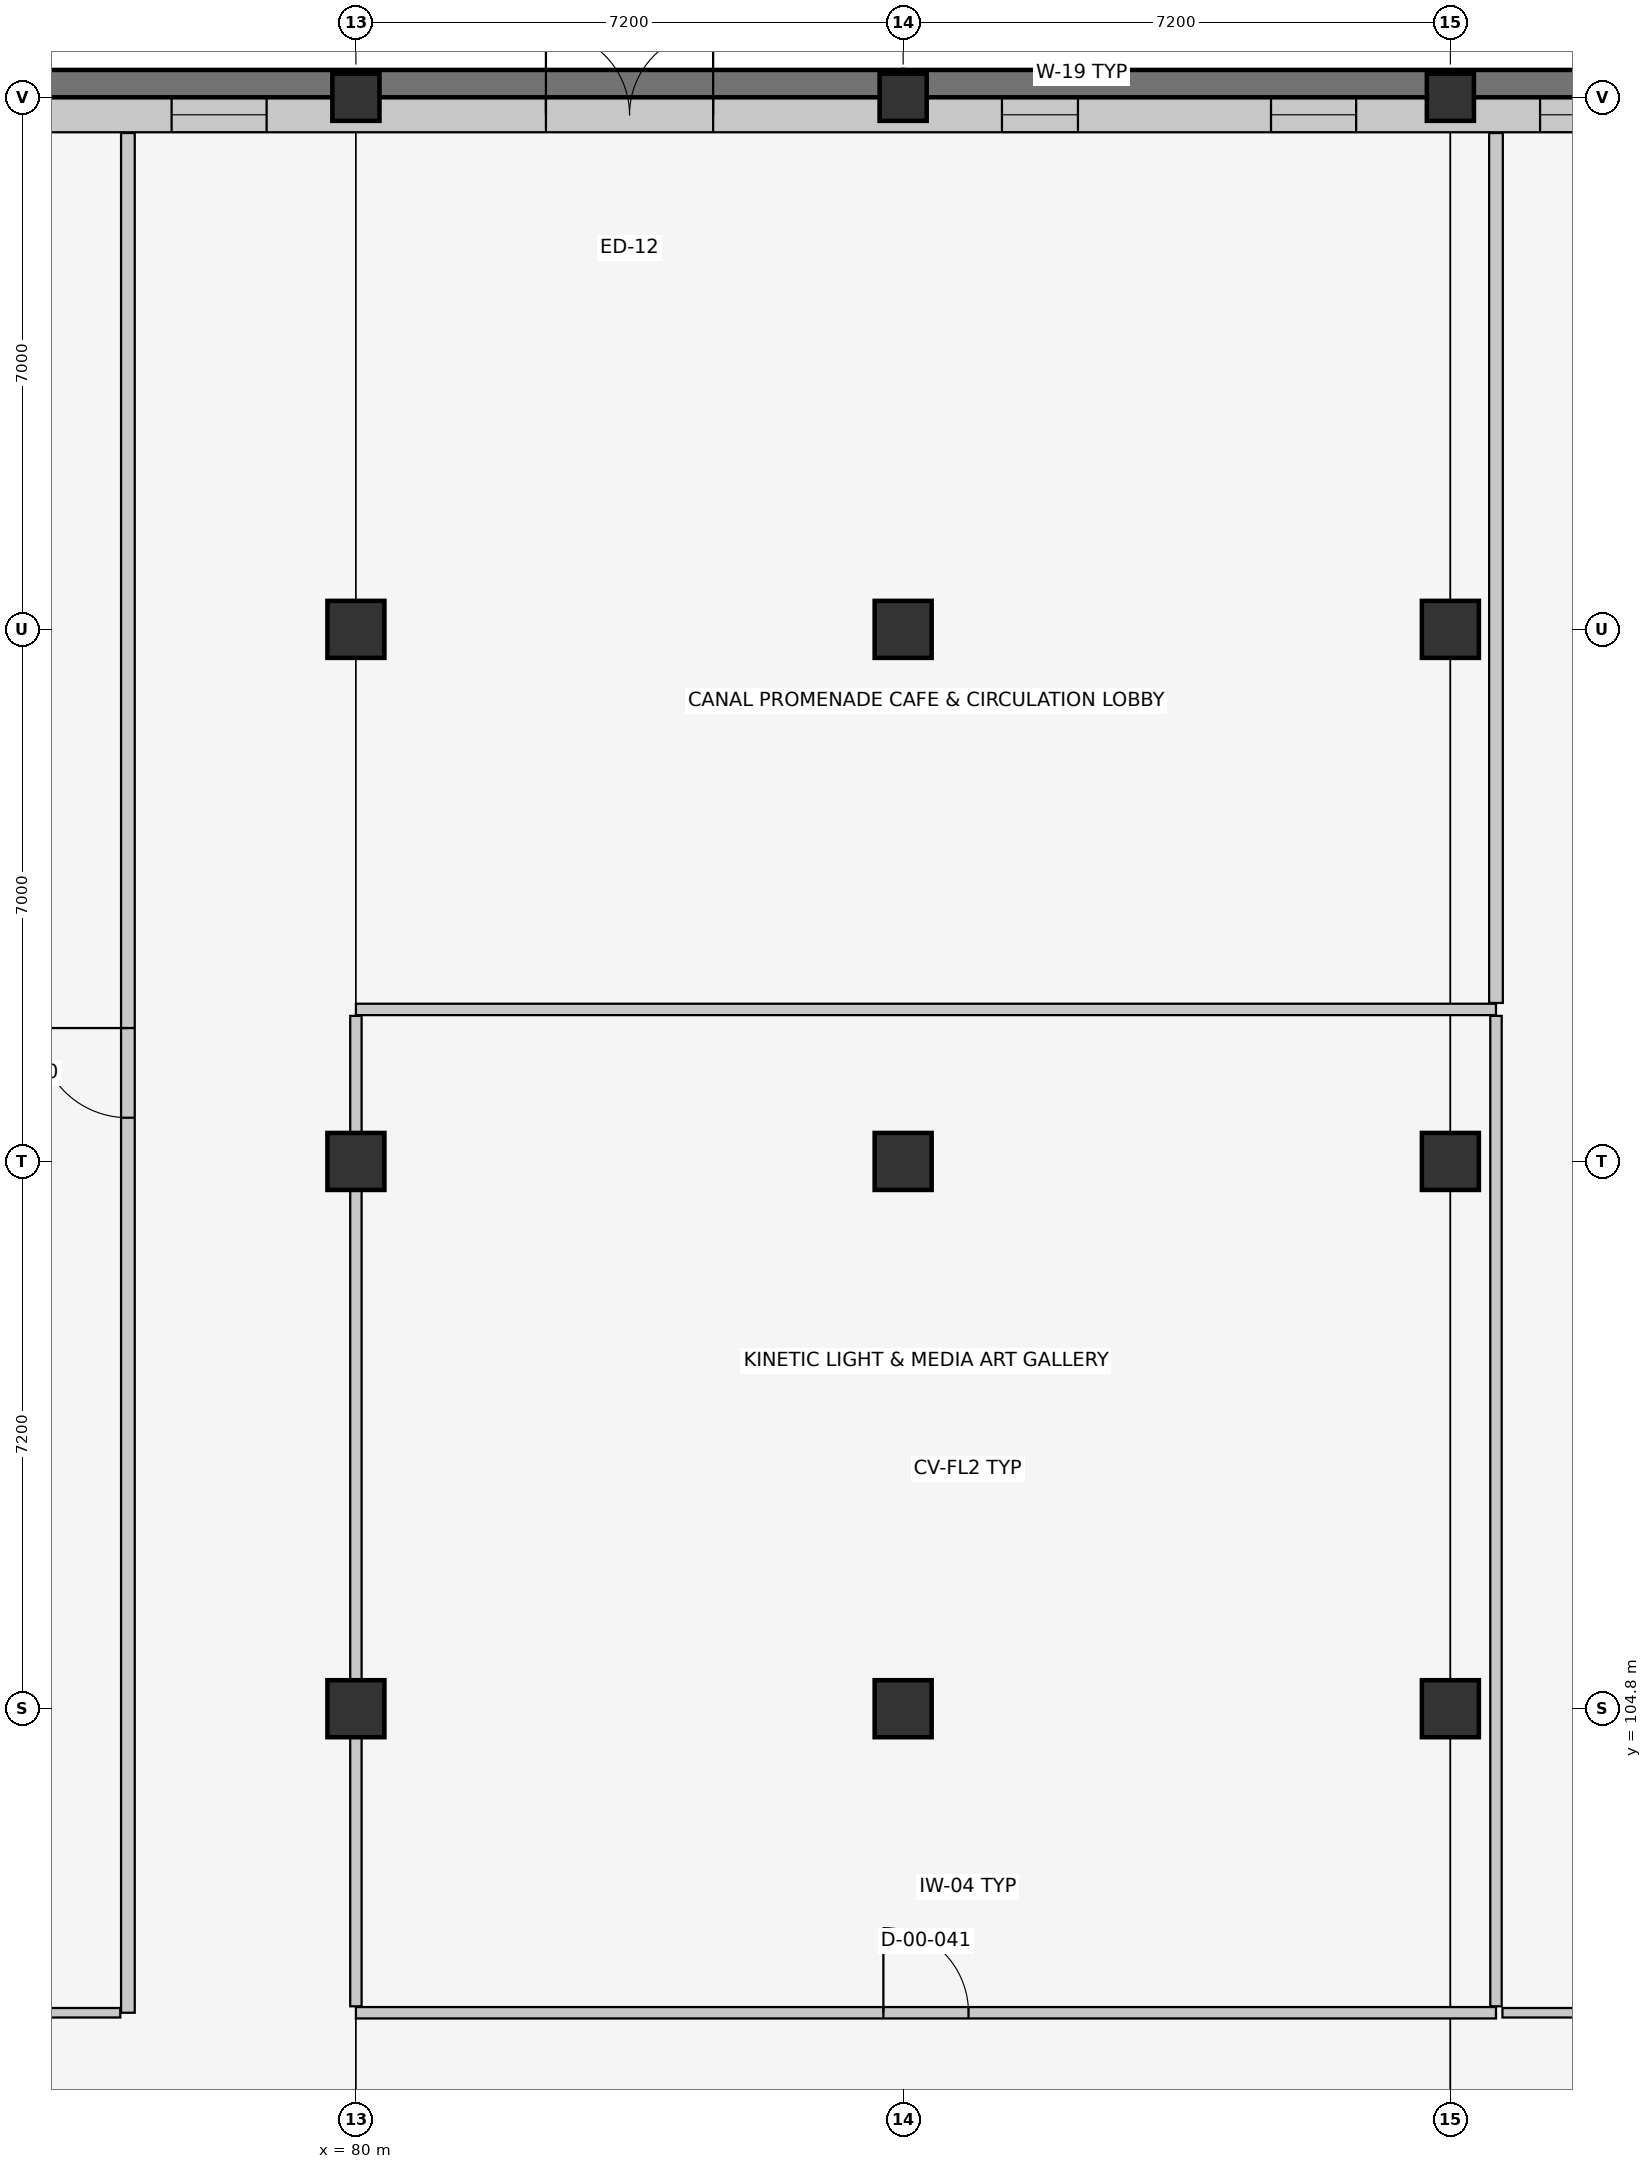
"""IFC4 building model, lengths in metres.
Left out: names, types, materials, properties, quantities, classifications, styles, units other than length and angle.
Written with IfcOpenShell. Run it as: python <this file> out.ifc"""

import sys

from ifc_helpers import new_model, si_unit, direction, frame, frame_2d, origin, origin_2d, place, context, subcontext, project, spatial, rectangle, circle, extrude, element, fill, save


model = new_model("IFC4")
c1 = context("Model", 3, precision=1e-05, world=origin(), true_north=direction((0.0, 1.0)))
c2 = subcontext(c1, "Body", "Model", "MODEL_VIEW")
j1 = project(units=[si_unit("LENGTHUNIT", "METRE"), si_unit("PLANEANGLEUNIT", "RADIAN")], contexts=[c1])
p1 = place(None, origin())
s1 = spatial("IfcSite", under=j1, at=p1, CompositionType="ELEMENT")
p2 = place(p1, origin())
s2 = spatial("IfcBuilding", under=s1, at=p2, CompositionType="ELEMENT")
p3 = place(p2, origin())
s3 = spatial("IfcBuildingStorey", under=s2, at=p3, CompositionType="ELEMENT", Elevation=0.0)
for number, where, z_axis, x_axis in (
    (1, (80.0, 104.8, 0.0), (0.0, 0.0, 1.0), (1.0, 0.0, 0.0)),
    (2, (80.0, 112.0, 0.0), (0.0, 0.0, 1.0), (1.0, 0.0, 0.0)),
    (3, (80.0, 119.0, 0.0), (0.0, 0.0, 1.0), (1.0, 0.0, 0.0)),
):
    element("IfcColumn", number, at=place(p3, frame(where, z_axis=z_axis, x_axis=x_axis)), inside=s3, PredefinedType="COLUMN", context=c2, shape_type="SweptSolid", body=[
        extrude(circle(Radius=0.375, at=origin_2d()), origin(), (0.0, 0.0, 1.0), 5.4),
    ])
p4 = place(p3, frame((80.0, 126.0, 0.0), z_axis=(0.0, 0.0, 1.0), x_axis=(1.0, 0.0, 0.0)))
e4 = element("IfcColumn", 4, at=p4, inside=s3, PredefinedType="COLUMN", context=c2, shape_type="SweptSolid", body=[
    extrude(rectangle(XDim=0.62, YDim=0.62, at=origin_2d()), origin(), (0.0, 0.0, 1.0), 5.4),
])
for number, where, z_axis, x_axis in (
    (5, (87.2, 104.8, 0.0), (0.0, 0.0, 1.0), (1.0, 0.0, 0.0)),
    (6, (87.2, 112.0, 0.0), (0.0, 0.0, 1.0), (1.0, 0.0, 0.0)),
    (7, (87.2, 119.0, 0.0), (0.0, 0.0, 1.0), (1.0, 0.0, 0.0)),
):
    element("IfcColumn", number, at=place(p3, frame(where, z_axis=z_axis, x_axis=x_axis)), inside=s3, PredefinedType="COLUMN", context=c2, shape_type="SweptSolid", body=[
        extrude(circle(Radius=0.375, at=origin_2d()), origin(), (0.0, 0.0, 1.0), 5.4),
    ])
p5 = place(p3, frame((87.2, 126.0, 0.0), z_axis=(0.0, 0.0, 1.0), x_axis=(1.0, 0.0, 0.0)))
e8 = element("IfcColumn", 8, at=p5, inside=s3, PredefinedType="COLUMN", context=c2, shape_type="SweptSolid", body=[
    extrude(rectangle(XDim=0.62, YDim=0.62, at=origin_2d()), origin(), (0.0, 0.0, 1.0), 5.4),
])
for number, where, z_axis, x_axis in (
    (9, (94.4, 104.8, 0.0), (0.0, 0.0, 1.0), (1.0, 0.0, 0.0)),
    (10, (94.4, 112.0, 0.0), (0.0, 0.0, 1.0), (1.0, 0.0, 0.0)),
    (11, (94.4, 119.0, 0.0), (0.0, 0.0, 1.0), (1.0, 0.0, 0.0)),
):
    element("IfcColumn", number, at=place(p3, frame(where, z_axis=z_axis, x_axis=x_axis)), inside=s3, PredefinedType="COLUMN", context=c2, shape_type="SweptSolid", body=[
        extrude(circle(Radius=0.375, at=origin_2d()), origin(), (0.0, 0.0, 1.0), 5.4),
    ])
p6 = place(p3, frame((94.4, 126.0, 0.0), z_axis=(0.0, 0.0, 1.0), x_axis=(1.0, 0.0, 0.0)))
e12 = element("IfcColumn", 12, at=p6, inside=s3, PredefinedType="COLUMN", context=c2, shape_type="SweptSolid", body=[
    extrude(rectangle(XDim=0.62, YDim=0.62, at=origin_2d()), origin(), (0.0, 0.0, 1.0), 5.4),
])
p7 = place(p3, frame((65.6, 125.77, 0.0), z_axis=(0.0, 0.0, 1.0), x_axis=(1.0, 0.0, 0.0)))
e13 = element("IfcWall", 13, at=p7, inside=s3, PredefinedType="SOLIDWALL", context=c2, shape_type="SweptSolid", body=[
    extrude(rectangle(XDim=43.2, YDim=0.46, at=frame_2d((21.6, 0.0))), origin(), (0.0, 0.0, 1.0), 4.455),
])
p8 = place(p7, frame((16.9, 0.0, 0.0)))
e14 = element("IfcOpeningElement", 14, at=p8, cuts=e13, PredefinedType="OPENING", context=c2, shape_type="SweptSolid", body=[
    extrude(rectangle(XDim=2.2, YDim=2.4, at=frame_2d((1.1, 1.2))), frame((0.0, 0.242, 0.0), z_axis=(0.0, -1.0, 0.0), x_axis=(1.0, 0.0, 0.0)), (0.0, 0.0, 1.0), 0.484),
])
p9 = place(p7, frame((1.35, 0.0, 0.9)))
e15 = element("IfcOpeningElement", 15, at=p9, cuts=e13, PredefinedType="OPENING", context=c2, shape_type="SweptSolid", body=[
    extrude(rectangle(XDim=0.9, YDim=1.6, at=frame_2d((0.45, 0.8))), frame((0.0, 0.242, 0.0), z_axis=(0.0, -1.0, 0.0), x_axis=(1.0, 0.0, 0.0)), (0.0, 0.0, 1.0), 0.484),
])
p10 = place(p7, frame((4.875, 0.0, 0.9)))
e16 = element("IfcOpeningElement", 16, at=p10, cuts=e13, PredefinedType="OPENING", context=c2, shape_type="SweptSolid", body=[
    extrude(rectangle(XDim=1.05, YDim=1.6, at=frame_2d((0.525, 0.8))), frame((0.0, 0.242, 0.0), z_axis=(0.0, -1.0, 0.0), x_axis=(1.0, 0.0, 0.0)), (0.0, 0.0, 1.0), 0.484),
])
p11 = place(p7, frame((8.425, 0.0, 0.9)))
e17 = element("IfcOpeningElement", 17, at=p11, cuts=e13, PredefinedType="OPENING", context=c2, shape_type="SweptSolid", body=[
    extrude(rectangle(XDim=1.15, YDim=1.6, at=frame_2d((0.575, 0.8))), frame((0.0, 0.242, 0.0), z_axis=(0.0, -1.0, 0.0), x_axis=(1.0, 0.0, 0.0)), (0.0, 0.0, 1.0), 0.484),
])
p12 = place(p7, frame((11.975, 0.0, 0.9)))
e18 = element("IfcOpeningElement", 18, at=p12, cuts=e13, PredefinedType="OPENING", context=c2, shape_type="SweptSolid", body=[
    extrude(rectangle(XDim=1.25, YDim=1.6, at=frame_2d((0.625, 0.8))), frame((0.0, 0.242, 0.0), z_axis=(0.0, -1.0, 0.0), x_axis=(1.0, 0.0, 0.0)), (0.0, 0.0, 1.0), 0.484),
])
p13 = place(p7, frame((22.9, 0.0, 0.9)))
e19 = element("IfcOpeningElement", 19, at=p13, cuts=e13, PredefinedType="OPENING", context=c2, shape_type="SweptSolid", body=[
    extrude(rectangle(XDim=1.0, YDim=1.75, at=frame_2d((0.5, 0.875))), frame((0.0, 0.242, 0.0), z_axis=(0.0, -1.0, 0.0), x_axis=(1.0, 0.0, 0.0)), (0.0, 0.0, 1.0), 0.484),
])
p14 = place(p7, frame((26.44, 0.0, 0.9)))
e20 = element("IfcOpeningElement", 20, at=p14, cuts=e13, PredefinedType="OPENING", context=c2, shape_type="SweptSolid", body=[
    extrude(rectangle(XDim=1.12, YDim=1.75, at=frame_2d((0.56, 0.875))), frame((0.0, 0.242, 0.0), z_axis=(0.0, -1.0, 0.0), x_axis=(1.0, 0.0, 0.0)), (0.0, 0.0, 1.0), 0.484),
])
p15 = place(p7, frame((29.98, 0.0, 0.9)))
e21 = element("IfcOpeningElement", 21, at=p15, cuts=e13, PredefinedType="OPENING", context=c2, shape_type="SweptSolid", body=[
    extrude(rectangle(XDim=1.24, YDim=1.75, at=frame_2d((0.62, 0.875))), frame((0.0, 0.242, 0.0), z_axis=(0.0, -1.0, 0.0), x_axis=(1.0, 0.0, 0.0)), (0.0, 0.0, 1.0), 0.484),
])
p16 = place(p7, frame((33.53, 0.0, 0.9)))
e22 = element("IfcOpeningElement", 22, at=p16, cuts=e13, PredefinedType="OPENING", context=c2, shape_type="SweptSolid", body=[
    extrude(rectangle(XDim=1.34, YDim=1.75, at=frame_2d((0.67, 0.875))), frame((0.0, 0.242, 0.0), z_axis=(0.0, -1.0, 0.0), x_axis=(1.0, 0.0, 0.0)), (0.0, 0.0, 1.0), 0.484),
])
p17 = place(p7, frame((37.08, 0.0, 0.9)))
e23 = element("IfcOpeningElement", 23, at=p17, cuts=e13, PredefinedType="OPENING", context=c2, shape_type="SweptSolid", body=[
    extrude(rectangle(XDim=1.44, YDim=1.75, at=frame_2d((0.72, 0.875))), frame((0.0, 0.242, 0.0), z_axis=(0.0, -1.0, 0.0), x_axis=(1.0, 0.0, 0.0)), (0.0, 0.0, 1.0), 0.484),
])
p18 = place(p7, frame((40.65, 0.0, 0.9)))
e24 = element("IfcOpeningElement", 24, at=p18, cuts=e13, PredefinedType="OPENING", context=c2, shape_type="SweptSolid", body=[
    extrude(rectangle(XDim=1.5, YDim=1.75, at=frame_2d((0.75, 0.875))), frame((0.0, 0.242, 0.0), z_axis=(0.0, -1.0, 0.0), x_axis=(1.0, 0.0, 0.0)), (0.0, 0.0, 1.0), 0.484),
])
p19 = place(p3, frame((65.8, 126.18, -0.8), z_axis=(0.0, 0.0, 1.0), x_axis=(1.0, 0.0, 0.0)))
e25 = element("IfcWall", 25, at=p19, inside=s3, PredefinedType="USERDEFINED", context=c2, shape_type="SweptSolid", body=[
    extrude(rectangle(XDim=21.4, YDim=0.36, at=frame_2d((10.7, 0.0))), origin(), (0.0, 0.0, 1.0), 1.35),
])
p20 = place(p3, frame((87.2, 126.18, -0.8), z_axis=(0.0, 0.0, 1.0), x_axis=(1.0, 0.0, 0.0)))
e26 = element("IfcWall", 26, at=p20, inside=s3, PredefinedType="USERDEFINED", context=c2, shape_type="SweptSolid", body=[
    extrude(rectangle(XDim=21.4, YDim=0.36, at=frame_2d((10.7, 0.0))), origin(), (0.0, 0.0, 1.0), 1.35),
])
p21 = place(p3, frame((77.0, 100.8, 0.0), z_axis=(0.0, 0.0, 1.0), x_axis=(0.0, 1.0, 0.0)))
e27 = element("IfcWall", 27, at=p21, inside=s3, PredefinedType="PARTITIONING", context=c2, shape_type="SweptSolid", body=[
    extrude(rectangle(XDim=24.73, YDim=0.18, at=frame_2d((12.365, 0.0))), origin(), (0.0, 0.0, 1.0), 5.12),
])
p22 = place(p21, frame((11.775, 0.0, 0.0)))
e28 = element("IfcOpeningElement", 28, at=p22, cuts=e27, PredefinedType="OPENING", context=c2, shape_type="SweptSolid", body=[
    extrude(rectangle(XDim=1.18, YDim=2.2, at=frame_2d((0.59, 1.1))), frame((0.0, 0.102, 0.0), z_axis=(0.0, -1.0, 0.0), x_axis=(1.0, 0.0, 0.0)), (0.0, 0.0, 1.0), 0.204),
])
p23 = place(p3, frame((66.07, 100.8, 0.0), z_axis=(0.0, 0.0, 1.0), x_axis=(1.0, 0.0, 0.0)))
e29 = element("IfcWall", 29, at=p23, inside=s3, PredefinedType="PARTITIONING", context=c2, shape_type="SweptSolid", body=[
    extrude(rectangle(XDim=10.83, YDim=0.125, at=frame_2d((5.415, 0.0))), origin(), (0.0, 0.0, 1.0), 5.12),
])
p24 = place(p3, frame((80.0, 100.8, 0.0), z_axis=(0.0, 0.0, 1.0), x_axis=(1.0, 0.0, 0.0)))
e30 = element("IfcWall", 30, at=p24, inside=s3, PredefinedType="PARTITIONING", context=c2, shape_type="SweptSolid", body=[
    extrude(rectangle(XDim=15.0, YDim=0.15, at=frame_2d((7.5, 0.0))), origin(), (0.0, 0.0, 1.0), 5.12),
])
p25 = place(p24, frame((6.94, 0.0, 0.0)))
e31 = element("IfcOpeningElement", 31, at=p25, cuts=e30, PredefinedType="OPENING", context=c2, shape_type="SweptSolid", body=[
    extrude(rectangle(XDim=1.12, YDim=2.15, at=frame_2d((0.56, 1.075))), frame((0.0, 0.087, 0.0), z_axis=(0.0, -1.0, 0.0), x_axis=(1.0, 0.0, 0.0)), (0.0, 0.0, 1.0), 0.174),
])
p26 = place(p3, frame((80.0, 114.0, 0.0), z_axis=(0.0, 0.0, 1.0), x_axis=(1.0, 0.0, 0.0)))
e32 = element("IfcWall", 32, at=p26, inside=s3, PredefinedType="PARTITIONING", context=c2, shape_type="SweptSolid", body=[
    extrude(rectangle(XDim=15.0, YDim=0.15, at=frame_2d((7.5, 0.0))), origin(), (0.0, 0.0, 1.0), 5.12),
])
p27 = place(p3, frame((80.0, 100.885, 0.0), z_axis=(0.0, 0.0, 1.0), x_axis=(0.0, 1.0, 0.0)))
e33 = element("IfcWall", 33, at=p27, inside=s3, PredefinedType="PARTITIONING", context=c2, shape_type="SweptSolid", body=[
    extrude(rectangle(XDim=13.03, YDim=0.15, at=frame_2d((6.515, 0.0))), origin(), (0.0, 0.0, 1.0), 4.495),
])
p28 = place(p3, frame((95.0, 100.885, 0.0), z_axis=(0.0, 0.0, 1.0), x_axis=(0.0, 1.0, 0.0)))
e34 = element("IfcWall", 34, at=p28, inside=s3, PredefinedType="PARTITIONING", context=c2, shape_type="SweptSolid", body=[
    extrude(rectangle(XDim=13.03, YDim=0.15, at=frame_2d((6.515, 0.0))), origin(), (0.0, 0.0, 1.0), 5.12),
])
p29 = place(p3, frame((95.0, 114.085, 0.0), z_axis=(0.0, 0.0, 1.0), x_axis=(0.0, 1.0, 0.0)))
e35 = element("IfcWall", 35, at=p29, inside=s3, PredefinedType="PARTITIONING", context=c2, shape_type="SweptSolid", body=[
    extrude(rectangle(XDim=11.445, YDim=0.18, at=frame_2d((5.723, 0.0))), origin(), (0.0, 0.0, 1.0), 5.16),
])
p30 = place(p3, frame((95.085, 100.8, 0.0), z_axis=(0.0, 0.0, 1.0), x_axis=(1.0, 0.0, 0.0)))
e36 = element("IfcWall", 36, at=p30, inside=s3, PredefinedType="PARTITIONING", context=c2, shape_type="SweptSolid", body=[
    extrude(rectangle(XDim=13.245, YDim=0.125, at=frame_2d((6.623, 0.0))), origin(), (0.0, 0.0, 1.0), 5.12),
])
p31 = place(p30, frame((6.083, 0.0, 0.0)))
e37 = element("IfcOpeningElement", 37, at=p31, cuts=e36, PredefinedType="OPENING", context=c2, shape_type="SweptSolid", body=[
    extrude(rectangle(XDim=1.08, YDim=2.15, at=frame_2d((0.54, 1.075))), frame((0.0, 0.074, 0.0), z_axis=(0.0, -1.0, 0.0), x_axis=(1.0, 0.0, 0.0)), (0.0, 0.0, 1.0), 0.149),
])
p32 = place(p8, origin())
e38 = element("IfcDoor", 38, at=p32, inside=s3, OperationType="DOUBLE_DOOR_SINGLE_SWING", PredefinedType="DOOR", context=c2, shape_type="SweptSolid", body=[
    extrude(rectangle(XDim=2.2, YDim=2.4, at=frame_2d((1.1, 1.2))), frame((0.0, 0.025, 0.0), z_axis=(0.0, -1.0, 0.0), x_axis=(1.0, 0.0, 0.0)), (0.0, 0.0, 1.0), 0.05),
])
fill(e14, e38)
p33 = place(p12, origin())
e39 = element("IfcWindow", 39, at=p33, inside=s3, PartitioningType="SINGLE_PANEL", PredefinedType="WINDOW", context=c2, shape_type="SweptSolid", body=[
    extrude(rectangle(XDim=1.25, YDim=1.6, at=frame_2d((0.625, 0.8))), frame((0.0, 0.03, 0.0), z_axis=(0.0, -1.0, 0.0), x_axis=(1.0, 0.0, 0.0)), (0.0, 0.0, 1.0), 0.06),
])
fill(e18, e39)
p34 = place(p13, origin())
e40 = element("IfcWindow", 40, at=p34, inside=s3, PartitioningType="SINGLE_PANEL", PredefinedType="WINDOW", context=c2, shape_type="SweptSolid", body=[
    extrude(rectangle(XDim=1.0, YDim=1.75, at=frame_2d((0.5, 0.875))), frame((0.0, 0.03, 0.0), z_axis=(0.0, -1.0, 0.0), x_axis=(1.0, 0.0, 0.0)), (0.0, 0.0, 1.0), 0.06),
])
fill(e19, e40)
p35 = place(p14, origin())
e41 = element("IfcWindow", 41, at=p35, inside=s3, PartitioningType="SINGLE_PANEL", PredefinedType="WINDOW", context=c2, shape_type="SweptSolid", body=[
    extrude(rectangle(XDim=1.12, YDim=1.75, at=frame_2d((0.56, 0.875))), frame((0.0, 0.03, 0.0), z_axis=(0.0, -1.0, 0.0), x_axis=(1.0, 0.0, 0.0)), (0.0, 0.0, 1.0), 0.06),
])
fill(e20, e41)
p36 = place(p15, origin())
e42 = element("IfcWindow", 42, at=p36, inside=s3, PartitioningType="SINGLE_PANEL", PredefinedType="WINDOW", context=c2, shape_type="SweptSolid", body=[
    extrude(rectangle(XDim=1.24, YDim=1.75, at=frame_2d((0.62, 0.875))), frame((0.0, 0.03, 0.0), z_axis=(0.0, -1.0, 0.0), x_axis=(1.0, 0.0, 0.0)), (0.0, 0.0, 1.0), 0.06),
])
fill(e21, e42)
p37 = place(p22, origin())
e43 = element("IfcDoor", 43, at=p37, inside=s3, OperationType="SINGLE_SWING_RIGHT", PredefinedType="DOOR", context=c2, shape_type="SweptSolid", body=[
    extrude(rectangle(XDim=1.18, YDim=2.2, at=frame_2d((0.59, 1.1))), frame((0.0, 0.025, 0.0), z_axis=(0.0, -1.0, 0.0), x_axis=(1.0, 0.0, 0.0)), (0.0, 0.0, 1.0), 0.05),
])
fill(e28, e43)
p38 = place(p25, origin())
e44 = element("IfcDoor", 44, at=p38, inside=s3, OperationType="SINGLE_SWING_LEFT", PredefinedType="DOOR", context=c2, shape_type="SweptSolid", body=[
    extrude(rectangle(XDim=1.12, YDim=2.15, at=frame_2d((0.56, 1.075))), frame((0.0, 0.025, 0.0), z_axis=(0.0, -1.0, 0.0), x_axis=(1.0, 0.0, 0.0)), (0.0, 0.0, 1.0), 0.05),
])
fill(e31, e44)
save(model, sys.argv[1])
